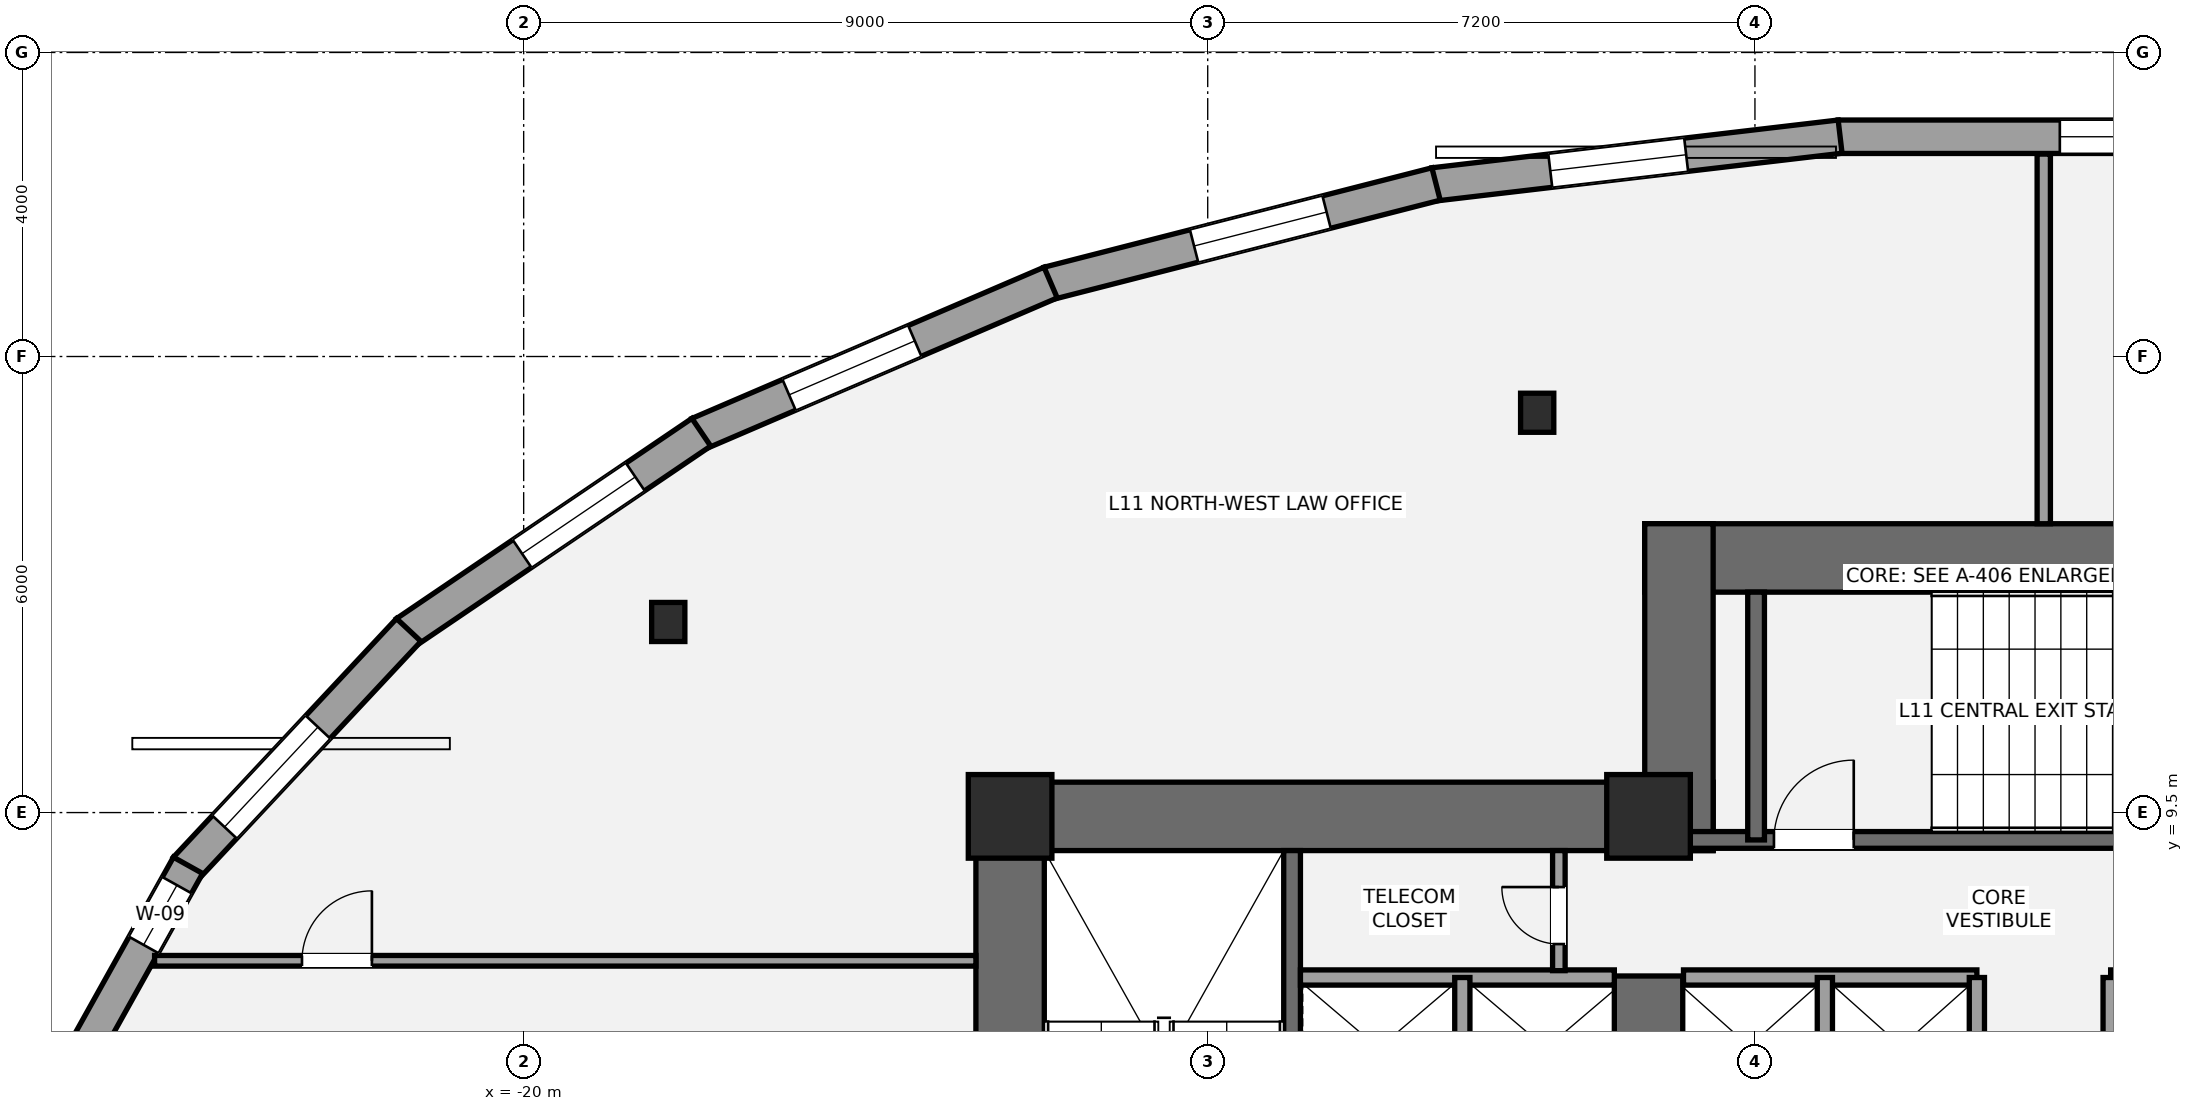
"""IFC4 building model, lengths in metres.
Left out: names, types, materials, properties, quantities, classifications, styles, units other than length and angle.
Written with IfcOpenShell. Run it as: python <this file> out.ifc"""

import sys

from ifc_helpers import new_model, si_unit, direction, frame, frame_2d, origin, origin_2d, place, context, subcontext, project, spatial, rectangle, i_section, extrude, element, fill, save


model = new_model("IFC4")
c1 = context("Model", 3, precision=1e-05, world=origin(), true_north=direction((0.0, 1.0)))
c2 = subcontext(c1, "Body", "Model", "MODEL_VIEW")
j1 = project(units=[si_unit("LENGTHUNIT", "METRE"), si_unit("PLANEANGLEUNIT", "RADIAN")], contexts=[c1])
p1 = place(None, origin())
s1 = spatial("IfcSite", under=j1, at=p1, CompositionType="ELEMENT")
p2 = place(p1, origin())
s2 = spatial("IfcBuilding", under=s1, at=p2, CompositionType="ELEMENT")
p3 = place(p2, frame((0.0, 0.0, 45.0)))
s3 = spatial("IfcBuildingStorey", under=s2, at=p3, CompositionType="ELEMENT", Elevation=45.0)
p4 = place(p3, frame((-13.6, 0.95, 0.0), z_axis=(0.0, 0.0, 1.0), x_axis=(0.0, 1.0, 0.0)))
e1 = element("IfcWall", 1, at=p4, inside=s3, PredefinedType="SHEAR", context=c2, shape_type="SweptSolid", body=[
    extrude(rectangle(XDim=8.95, YDim=0.9, at=frame_2d((4.475, 0.0))), origin(), (0.0, 0.0, 1.0), 3.6),
])
p5 = place(p3, frame((-14.05, 9.45, 0.0), z_axis=(0.0, 0.0, 1.0), x_axis=(1.0, 0.0, 0.0)))
e2 = element("IfcWall", 2, at=p5, inside=s3, PredefinedType="SHEAR", context=c2, shape_type="SweptSolid", body=[
    extrude(rectangle(XDim=9.7, YDim=0.9, at=frame_2d((4.85, 0.0))), origin(), (0.0, 0.0, 1.0), 3.6),
])
p6 = place(p3, frame((-5.2, 5.35, 0.0), z_axis=(0.0, 0.0, 1.0), x_axis=(0.0, 1.0, 0.0)))
e3 = element("IfcWall", 3, at=p6, inside=s3, PredefinedType="SHEAR", context=c2, shape_type="SweptSolid", body=[
    extrude(rectangle(XDim=2.0, YDim=0.9, at=frame_2d((1.0, 0.0))), origin(), (0.0, 0.0, 1.0), 3.6),
])
p7 = place(p3, frame((-9.89, 1.85, 0.0), z_axis=(0.0, 0.0, 1.0), x_axis=(0.0, 1.0, 0.0)))
e4 = element("IfcWall", 4, at=p7, inside=s3, PredefinedType="SHEAR", context=c2, shape_type="SweptSolid", body=[
    extrude(rectangle(XDim=7.15, YDim=0.22, at=frame_2d((3.575, 0.0))), origin(), (0.0, 0.0, 1.0), 3.6),
])
p8 = place(p3, frame((-5.25, 12.85, 0.0), z_axis=(0.0, 0.0, 1.0), x_axis=(1.0, 0.0, 0.0)))
e5 = element("IfcWall", 5, at=p8, inside=s3, PredefinedType="SHEAR", context=c2, shape_type="SweptSolid", body=[
    extrude(rectangle(XDim=10.5, YDim=0.9, at=frame_2d((5.25, 0.0))), origin(), (0.0, 0.0, 1.0), 3.6),
])
p9 = place(p3, frame((-4.8, 9.0, 0.0), z_axis=(0.0, 0.0, 1.0), x_axis=(0.0, 1.0, 0.0)))
e6 = element("IfcWall", 6, at=p9, inside=s3, PredefinedType="SHEAR", context=c2, shape_type="SweptSolid", body=[
    extrude(rectangle(XDim=4.3, YDim=0.9, at=frame_2d((2.15, 0.0))), origin(), (0.0, 0.0, 1.0), 3.6),
])
p10 = place(p3, frame((-4.7, 9.14, 0.0), z_axis=(0.0, 0.0, 1.0), x_axis=(1.0, 0.0, 0.0)))
e7 = element("IfcWall", 7, at=p10, inside=s3, PredefinedType="SHEAR", context=c2, shape_type="SweptSolid", body=[
    extrude(rectangle(XDim=9.3, YDim=0.22, at=frame_2d((4.65, 0.0))), origin(), (0.0, 0.0, 1.0), 3.6),
])
p11 = place(p10, frame((1.15, 0.0, 0.0)))
e8 = element("IfcOpeningElement", 8, at=p11, cuts=e7, PredefinedType="OPENING", context=c2, shape_type="SweptSolid", body=[
    extrude(rectangle(XDim=1.05, YDim=2.15, at=frame_2d((0.525, 1.075))), frame((0.0, 0.12, 0.0), z_axis=(0.0, -1.0, 0.0), x_axis=(1.0, 0.0, 0.0)), (0.0, 0.0, 1.0), 0.24),
])
p12 = place(p3, frame((-3.785, 9.14, 0.0), z_axis=(0.0, 0.0, 1.0), x_axis=(0.0, 1.0, 0.0)))
e9 = element("IfcWall", 9, at=p12, inside=s3, PredefinedType="SHEAR", context=c2, shape_type="SweptSolid", body=[
    extrude(rectangle(XDim=3.26, YDim=0.22, at=frame_2d((1.63, 0.0))), origin(), (0.0, 0.0, 1.0), 3.6),
])
for number, where, z_axis, x_axis in (
    (10, (-13.6, 9.45, 0.0), (0.0, 0.0, 1.0), (1.0, 0.0, 0.0)),
    (11, (-5.2, 9.45, 0.0), (0.0, 0.0, 1.0), (1.0, 0.0, 0.0)),
):
    element("IfcColumn", number, at=place(p3, frame(where, z_axis=z_axis, x_axis=x_axis)), inside=s3, PredefinedType="COLUMN", context=c2, shape_type="SweptSolid", body=[
        extrude(rectangle(XDim=1.1, YDim=1.1, at=origin_2d()), origin(), (0.0, 0.0, 1.0), 3.6),
    ])
for number, where, z_axis, x_axis in (
    (12, (-6.665, 14.76, 0.0), (0.0, 0.0, 1.0), (1.0, 0.0, 0.0)),
    (13, (-18.098, 12.007, 0.0), (0.0, 0.0, 1.0), (1.0, 0.0, 0.0)),
):
    element("IfcColumn", number, at=place(p3, frame(where, z_axis=z_axis, x_axis=x_axis)), inside=s3, PredefinedType="COLUMN", context=c2, shape_type="SweptSolid", body=[
        extrude(i_section(OverallWidth=0.437, OverallDepth=0.514, WebThickness=0.061, FlangeThickness=0.097, at=origin_2d()), origin(), (0.0, 0.0, 1.0), 3.6),
    ])
p13 = place(p3, frame((-2.705, 18.391, 0.0), z_axis=(0.0, 0.0, 1.0), x_axis=(1.0, 0.0, 0.0)))
e14 = element("IfcWall", 14, at=p13, inside=s3, PredefinedType="STANDARD", context=c2, shape_type="SweptSolid", body=[
    extrude(rectangle(XDim=5.41, YDim=0.44, at=frame_2d((2.705, 0.0))), origin(), (0.0, 0.0, 1.0), 2.529),
])
p14 = place(p13, frame((2.917, 0.0, 0.65)))
e15 = element("IfcOpeningElement", 15, at=p14, cuts=e14, PredefinedType="OPENING", context=c2, shape_type="SweptSolid", body=[
    extrude(rectangle(XDim=1.8, YDim=1.7, at=frame_2d((0.9, 0.85))), frame((0.0, 0.23, 0.0), z_axis=(0.0, -1.0, 0.0), x_axis=(1.0, 0.0, 0.0)), (0.0, 0.0, 1.0), 0.46),
])
p15 = place(p3, frame((-8.025, 17.764, 0.0), z_axis=(0.0, 0.0, 1.0), x_axis=(0.993159890371, 0.116762289112, 0.0)))
e16 = element("IfcWall", 16, at=p15, inside=s3, PredefinedType="STANDARD", context=c2, shape_type="SweptSolid", body=[
    extrude(rectangle(XDim=5.382, YDim=0.44, at=frame_2d((2.691, 0.0))), origin(), (0.0, 0.0, 1.0), 2.529),
])
p16 = place(p15, frame((1.542, 0.0, 0.65)))
e17 = element("IfcOpeningElement", 17, at=p16, cuts=e16, PredefinedType="OPENING", context=c2, shape_type="SweptSolid", body=[
    extrude(rectangle(XDim=1.8, YDim=1.7, at=frame_2d((0.9, 0.85))), frame((0.0, 0.23, 0.0), z_axis=(0.0, -1.0, 0.0), x_axis=(1.0, 0.0, 0.0)), (0.0, 0.0, 1.0), 0.46),
])
p17 = place(p3, frame((-13.099, 16.462, 0.0), z_axis=(0.0, 0.0, 1.0), x_axis=(0.968705592422, 0.248212560542, 0.0)))
e18 = element("IfcWall", 18, at=p17, inside=s3, PredefinedType="STANDARD", context=c2, shape_type="SweptSolid", body=[
    extrude(rectangle(XDim=5.268, YDim=0.44, at=frame_2d((2.634, 0.0))), origin(), (0.0, 0.0, 1.0), 2.529),
])
p18 = place(p17, frame((1.981, 0.0, 0.65)))
e19 = element("IfcOpeningElement", 19, at=p18, cuts=e18, PredefinedType="OPENING", context=c2, shape_type="SweptSolid", body=[
    extrude(rectangle(XDim=1.8, YDim=1.7, at=frame_2d((0.9, 0.85))), frame((0.0, 0.23, 0.0), z_axis=(0.0, -1.0, 0.0), x_axis=(1.0, 0.0, 0.0)), (0.0, 0.0, 1.0), 0.46),
])
p19 = place(p3, frame((-17.7, 14.483, 0.0), z_axis=(0.0, 0.0, 1.0), x_axis=(0.918881850071, 0.394532819433, 0.0)))
e20 = element("IfcWall", 20, at=p19, inside=s3, PredefinedType="STANDARD", context=c2, shape_type="SweptSolid", body=[
    extrude(rectangle(XDim=5.042, YDim=0.44, at=frame_2d((2.521, 0.0))), origin(), (0.0, 0.0, 1.0), 2.529),
])
p20 = place(p19, frame((1.297, 0.0, 0.65)))
e21 = element("IfcOpeningElement", 21, at=p20, cuts=e20, PredefinedType="OPENING", context=c2, shape_type="SweptSolid", body=[
    extrude(rectangle(XDim=1.8, YDim=1.7, at=frame_2d((0.9, 0.85))), frame((0.0, 0.23, 0.0), z_axis=(0.0, -1.0, 0.0), x_axis=(1.0, 0.0, 0.0)), (0.0, 0.0, 1.0), 0.46),
])
p21 = place(p3, frame((-21.549, 11.87, 0.0), z_axis=(0.0, 0.0, 1.0), x_axis=(0.827825981515, 0.560984976919, 0.0)))
e22 = element("IfcWall", 22, at=p21, inside=s3, PredefinedType="STANDARD", context=c2, shape_type="SweptSolid", body=[
    extrude(rectangle(XDim=4.695, YDim=0.44, at=frame_2d((2.347, 0.0))), origin(), (0.0, 0.0, 1.0), 2.529),
])
p22 = place(p21, frame((1.846, 0.0, 0.65)))
e23 = element("IfcOpeningElement", 23, at=p22, cuts=e22, PredefinedType="OPENING", context=c2, shape_type="SweptSolid", body=[
    extrude(rectangle(XDim=1.8, YDim=1.7, at=frame_2d((0.9, 0.85))), frame((0.0, 0.23, 0.0), z_axis=(0.0, -1.0, 0.0), x_axis=(1.0, 0.0, 0.0)), (0.0, 0.0, 1.0), 0.46),
])
p23 = place(p3, frame((-24.448, 8.763, 0.0), z_axis=(0.0, 0.0, 1.0), x_axis=(0.68299392258, 0.730424056093, 0.0)))
e24 = element("IfcWall", 24, at=p23, inside=s3, PredefinedType="STANDARD", context=c2, shape_type="SweptSolid", body=[
    extrude(rectangle(XDim=4.298, YDim=0.44, at=frame_2d((2.149, 0.0))), origin(), (0.0, 0.0, 1.0), 2.529),
])
p24 = place(p23, frame((0.75, 0.0, 0.65)))
e25 = element("IfcOpeningElement", 25, at=p24, cuts=e24, PredefinedType="OPENING", context=c2, shape_type="SweptSolid", body=[
    extrude(rectangle(XDim=1.8, YDim=1.7, at=frame_2d((0.9, 0.85))), frame((0.0, 0.23, 0.0), z_axis=(0.0, -1.0, 0.0), x_axis=(1.0, 0.0, 0.0)), (0.0, 0.0, 1.0), 0.46),
])
p25 = place(p3, frame((-26.346, 5.348, 0.0), z_axis=(0.0, 0.0, 1.0), x_axis=(0.487369438963, 0.873195871477, 0.0)))
e26 = element("IfcWall", 26, at=p25, inside=s3, PredefinedType="STANDARD", context=c2, shape_type="SweptSolid", body=[
    extrude(rectangle(XDim=3.96, YDim=0.44, at=frame_2d((1.98, 0.0))), origin(), (0.0, 0.0, 1.0), 2.529),
])
p26 = place(p25, frame((2.761, 0.0, 0.58)))
e27 = element("IfcOpeningElement", 27, at=p26, cuts=e26, PredefinedType="OPENING", context=c2, shape_type="SweptSolid", body=[
    extrude(rectangle(XDim=0.9, YDim=1.35, at=frame_2d((0.45, 0.675))), frame((0.0, 0.23, 0.0), z_axis=(0.0, -1.0, 0.0), x_axis=(1.0, 0.0, 0.0)), (0.0, 0.0, 1.0), 0.46),
])
p27 = place(p3, frame((-9.78, 7.33, 0.0), z_axis=(0.0, 0.0, 1.0), x_axis=(1.0, 0.0, 0.0)))
e28 = element("IfcWall", 28, at=p27, inside=s3, PredefinedType="SOLIDWALL", context=c2, shape_type="SweptSolid", body=[
    extrude(rectangle(XDim=4.13, YDim=0.2, at=frame_2d((2.065, 0.0))), origin(), (0.0, 0.0, 1.0), 3.4),
])
p28 = place(p3, frame((-7.65, 5.47, 0.0), z_axis=(0.0, 0.0, 1.0), x_axis=(0.0, 1.0, 0.0)))
e29 = element("IfcWall", 29, at=p28, inside=s3, PredefinedType="SOLIDWALL", context=c2, shape_type="SweptSolid", body=[
    extrude(rectangle(XDim=1.86, YDim=0.2, at=frame_2d((0.93, 0.0))), origin(), (0.0, 0.0, 1.0), 3.4),
])
for number, where, z_axis, x_axis in (
    (30, (-4.74, 7.33, 0.0), (0.0, 0.0, 1.0), (1.0, 0.0, 0.0)),
    (31, (0.88, 7.33, 0.0), (0.0, 0.0, 1.0), (1.0, 0.0, 0.0)),
):
    element("IfcWall", number, at=place(p3, frame(where, z_axis=z_axis, x_axis=x_axis)), inside=s3, PredefinedType="SOLIDWALL", context=c2, shape_type="SweptSolid", body=[
        extrude(rectangle(XDim=3.86, YDim=0.2, at=frame_2d((1.93, 0.0))), origin(), (0.0, 0.0, 1.0), 3.4),
    ])
for number, where, z_axis, x_axis in (
    (32, (-2.88, 5.52, 0.0), (0.0, 0.0, 1.0), (0.0, 1.0, 0.0)),
    (33, (-0.88, 5.52, 0.0), (0.0, 0.0, 1.0), (0.0, 1.0, 0.0)),
    (34, (0.88, 5.52, 0.0), (0.0, 0.0, 1.0), (0.0, 1.0, 0.0)),
):
    element("IfcWall", number, at=place(p3, frame(where, z_axis=z_axis, x_axis=x_axis)), inside=s3, PredefinedType="SOLIDWALL", context=c2, shape_type="SweptSolid", body=[
        extrude(rectangle(XDim=1.81, YDim=0.2, at=frame_2d((0.905, 0.0))), origin(), (0.0, 0.0, 1.0), 3.4),
    ])
p29 = place(p3, frame((-6.38, 7.42, 0.0), z_axis=(0.0, 0.0, 1.0), x_axis=(0.0, 1.0, 0.0)))
e35 = element("IfcWall", 35, at=p29, inside=s3, PredefinedType="PARTITIONING", context=c2, shape_type="SweptSolid", body=[
    extrude(rectangle(XDim=1.58, YDim=0.165, at=frame_2d((0.79, 0.0))), origin(), (0.0, 0.0, 1.0), 3.4),
])
p30 = place(p29, frame((0.35, 0.0, 0.0)))
e36 = element("IfcOpeningElement", 36, at=p30, cuts=e35, PredefinedType="OPENING", context=c2, shape_type="SweptSolid", body=[
    extrude(rectangle(XDim=0.75, YDim=2.1, at=frame_2d((0.375, 1.05))), frame((0.0, 0.093, 0.0), z_axis=(0.0, -1.0, 0.0), x_axis=(1.0, 0.0, 0.0)), (0.0, 0.0, 1.0), 0.185),
])
p31 = place(p3, frame((-24.856, 7.55, 0.0), z_axis=(0.0, 0.0, 1.0), x_axis=(1.0, 0.0, 0.0)))
e37 = element("IfcWall", 37, at=p31, inside=s3, PredefinedType="PARTITIONING", context=c2, shape_type="SweptSolid", body=[
    extrude(rectangle(XDim=10.806, YDim=0.14, at=frame_2d((5.403, 0.0))), origin(), (0.0, 0.0, 1.0), 2.853),
])
p32 = place(p31, frame((1.939, 0.0, 0.0)))
e38 = element("IfcOpeningElement", 38, at=p32, cuts=e37, PredefinedType="OPENING", context=c2, shape_type="SweptSolid", body=[
    extrude(rectangle(XDim=0.92, YDim=2.15, at=frame_2d((0.46, 1.075))), frame((0.0, 0.08, 0.0), z_axis=(0.0, -1.0, 0.0), x_axis=(1.0, 0.0, 0.0)), (0.0, 0.0, 1.0), 0.16),
])
p33 = place(p3, frame((0.0, 13.3, 0.0), z_axis=(0.0, 0.0, 1.0), x_axis=(0.0, 1.0, 0.0)))
e39 = element("IfcWall", 39, at=p33, inside=s3, PredefinedType="PARTITIONING", context=c2, shape_type="SweptSolid", body=[
    extrude(rectangle(XDim=4.863, YDim=0.175, at=frame_2d((2.432, 0.0))), origin(), (0.0, 0.0, 1.0), 3.4),
])
p34 = place(p14, origin())
e40 = element("IfcWindow", 40, at=p34, inside=s3, PartitioningType="SINGLE_PANEL", PredefinedType="WINDOW", context=c2, shape_type="SweptSolid", body=[
    extrude(rectangle(XDim=1.8, YDim=1.7, at=frame_2d((0.9, 0.85))), frame((0.0, -0.01, 0.0), z_axis=(0.0, -1.0, 0.0), x_axis=(1.0, 0.0, 0.0)), (0.0, 0.0, 1.0), 0.06),
])
fill(e15, e40)
p35 = place(p16, origin())
e41 = element("IfcWindow", 41, at=p35, inside=s3, PartitioningType="SINGLE_PANEL", PredefinedType="WINDOW", context=c2, shape_type="SweptSolid", body=[
    extrude(rectangle(XDim=1.8, YDim=1.7, at=frame_2d((0.9, 0.85))), frame((0.0, -0.01, 0.0), z_axis=(0.0, -1.0, 0.0), x_axis=(1.0, 0.0, 0.0)), (0.0, 0.0, 1.0), 0.06),
])
fill(e17, e41)
p36 = place(p18, origin())
e42 = element("IfcWindow", 42, at=p36, inside=s3, PartitioningType="SINGLE_PANEL", PredefinedType="WINDOW", context=c2, shape_type="SweptSolid", body=[
    extrude(rectangle(XDim=1.8, YDim=1.7, at=frame_2d((0.9, 0.85))), frame((0.0, -0.01, 0.0), z_axis=(0.0, -1.0, 0.0), x_axis=(1.0, 0.0, 0.0)), (0.0, 0.0, 1.0), 0.06),
])
fill(e19, e42)
p37 = place(p20, origin())
e43 = element("IfcWindow", 43, at=p37, inside=s3, PartitioningType="SINGLE_PANEL", PredefinedType="WINDOW", context=c2, shape_type="SweptSolid", body=[
    extrude(rectangle(XDim=1.8, YDim=1.7, at=frame_2d((0.9, 0.85))), frame((0.0, -0.01, 0.0), z_axis=(0.0, -1.0, 0.0), x_axis=(1.0, 0.0, 0.0)), (0.0, 0.0, 1.0), 0.06),
])
fill(e21, e43)
p38 = place(p22, origin())
e44 = element("IfcWindow", 44, at=p38, inside=s3, PartitioningType="SINGLE_PANEL", PredefinedType="WINDOW", context=c2, shape_type="SweptSolid", body=[
    extrude(rectangle(XDim=1.8, YDim=1.7, at=frame_2d((0.9, 0.85))), frame((0.0, -0.01, 0.0), z_axis=(0.0, -1.0, 0.0), x_axis=(1.0, 0.0, 0.0)), (0.0, 0.0, 1.0), 0.06),
])
fill(e23, e44)
p39 = place(p24, origin())
e45 = element("IfcWindow", 45, at=p39, inside=s3, PartitioningType="SINGLE_PANEL", PredefinedType="WINDOW", context=c2, shape_type="SweptSolid", body=[
    extrude(rectangle(XDim=1.8, YDim=1.7, at=frame_2d((0.9, 0.85))), frame((0.0, -0.01, 0.0), z_axis=(0.0, -1.0, 0.0), x_axis=(1.0, 0.0, 0.0)), (0.0, 0.0, 1.0), 0.06),
])
fill(e25, e45)
p40 = place(p26, origin())
e46 = element("IfcWindow", 46, at=p40, inside=s3, PartitioningType="SINGLE_PANEL", PredefinedType="WINDOW", context=c2, shape_type="SweptSolid", body=[
    extrude(rectangle(XDim=0.9, YDim=1.35, at=frame_2d((0.45, 0.675))), frame((0.0, -0.01, 0.0), z_axis=(0.0, -1.0, 0.0), x_axis=(1.0, 0.0, 0.0)), (0.0, 0.0, 1.0), 0.06),
])
fill(e27, e46)
p41 = place(p11, origin())
e47 = element("IfcDoor", 47, at=p41, inside=s3, OperationType="SINGLE_SWING_RIGHT", PredefinedType="DOOR", context=c2, shape_type="SweptSolid", body=[
    extrude(rectangle(XDim=1.05, YDim=2.15, at=frame_2d((0.525, 1.075))), frame((0.0, 0.025, 0.0), z_axis=(0.0, -1.0, 0.0), x_axis=(1.0, 0.0, 0.0)), (0.0, 0.0, 1.0), 0.05),
])
fill(e8, e47)
p42 = place(p30, origin())
e48 = element("IfcDoor", 48, at=p42, inside=s3, OperationType="SINGLE_SWING_RIGHT", PredefinedType="DOOR", context=c2, shape_type="SweptSolid", body=[
    extrude(rectangle(XDim=0.75, YDim=2.1, at=frame_2d((0.375, 1.05))), frame((0.0, 0.025, 0.0), z_axis=(0.0, -1.0, 0.0), x_axis=(1.0, 0.0, 0.0)), (0.0, 0.0, 1.0), 0.05),
])
fill(e36, e48)
p43 = place(p32, origin())
e49 = element("IfcDoor", 49, at=p43, inside=s3, OperationType="SINGLE_SWING_RIGHT", PredefinedType="DOOR", context=c2, shape_type="SweptSolid", body=[
    extrude(rectangle(XDim=0.92, YDim=2.15, at=frame_2d((0.46, 1.075))), frame((0.0, 0.025, 0.0), z_axis=(0.0, -1.0, 0.0), x_axis=(1.0, 0.0, 0.0)), (0.0, 0.0, 1.0), 0.05),
])
fill(e38, e49)
save(model, sys.argv[1])
